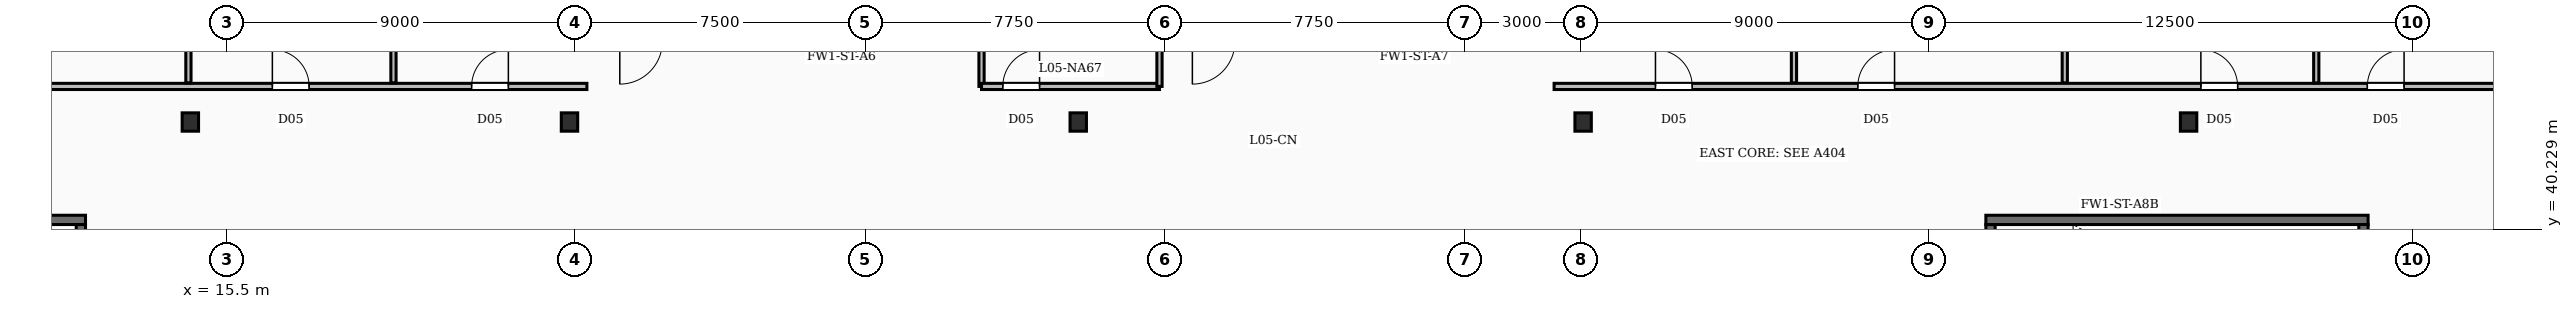
"""IFC4 building model, lengths in metres.
Left out: names, types, materials, properties, quantities, classifications, styles, units other than length and angle.
Written with IfcOpenShell. Run it as: python <this file> out.ifc"""

import sys

from ifc_helpers import new_model, si_unit, direction, frame, frame_2d, origin, origin_2d, place, context, subcontext, project, spatial, rectangle, i_section, extrude, element, fill, save


model = new_model("IFC4")
c1 = context("Model", 3, precision=1e-05, world=origin(), true_north=direction((0.0, 1.0)))
c2 = subcontext(c1, "Body", "Model", "MODEL_VIEW")
j1 = project(units=[si_unit("LENGTHUNIT", "METRE"), si_unit("PLANEANGLEUNIT", "RADIAN")], contexts=[c1])
p1 = place(None, origin())
s1 = spatial("IfcSite", under=j1, at=p1, CompositionType="ELEMENT")
p2 = place(p1, origin())
s2 = spatial("IfcBuilding", under=s1, at=p2, CompositionType="ELEMENT")
p3 = place(p2, frame((0.0, 0.0, 28.0)))
s3 = spatial("IfcBuildingStorey", under=s2, at=p3, CompositionType="ELEMENT", Elevation=28.0)
for number, where, z_axis, x_axis in (
    (1, (14.55, 43.0, -0.35), (0.0, 0.0, 1.0), (1.0, 0.0, 0.0)),
    (2, (24.35, 43.0, -0.35), (0.0, 0.0, 1.0), (1.0, 0.0, 0.0)),
    (3, (37.5, 43.0, -0.35), (0.0, 0.0, 1.0), (1.0, 0.0, 0.0)),
    (4, (50.55, 43.0, -0.35), (0.0, 0.0, 1.0), (1.0, 0.0, 0.0)),
    (5, (66.2, 43.0, -0.35), (0.0, 0.0, 1.0), (1.0, 0.0, 0.0)),
):
    element("IfcColumn", number, at=place(p3, frame(where, z_axis=z_axis, x_axis=x_axis)), inside=s3, PredefinedType="COLUMN", context=c2, shape_type="SweptSolid", body=[
        extrude(i_section(OverallWidth=0.424, OverallDepth=0.474, WebThickness=0.048, FlangeThickness=0.077, FilletRadius=0.02, at=origin_2d()), origin(), (0.0, 0.0, 1.0), 5.9),
    ])
p4 = place(p3, frame((1.96, 40.47, 0.0), z_axis=(0.0, 0.0, 1.0), x_axis=(1.0, 0.0, 0.0)))
e6 = element("IfcWall", 6, at=p4, inside=s3, PredefinedType="SOLIDWALL", context=c2, shape_type="SweptSolid", body=[
    extrude(rectangle(XDim=9.88, YDim=0.24, at=frame_2d((4.94, 0.0))), origin(), (0.0, 0.0, 1.0), 5.55),
])
p5 = place(p3, frame((11.72, 36.2, 0.0), z_axis=(0.0, 0.0, 1.0), x_axis=(0.0, 1.0, 0.0)))
e7 = element("IfcWall", 7, at=p5, inside=s3, PredefinedType="SOLIDWALL", context=c2, shape_type="SweptSolid", body=[
    extrude(rectangle(XDim=4.15, YDim=0.24, at=frame_2d((2.075, 0.0))), origin(), (0.0, 0.0, 1.0), 5.55),
])
p6 = place(p3, frame((60.96, 40.47, 0.0), z_axis=(0.0, 0.0, 1.0), x_axis=(1.0, 0.0, 0.0)))
e8 = element("IfcWall", 8, at=p6, inside=s3, PredefinedType="SOLIDWALL", context=c2, shape_type="SweptSolid", body=[
    extrude(rectangle(XDim=9.88, YDim=0.24, at=frame_2d((4.94, 0.0))), origin(), (0.0, 0.0, 1.0), 5.55),
])
for number, where, z_axis, x_axis in (
    (9, (61.08, 36.2, 0.0), (0.0, 0.0, 1.0), (0.0, 1.0, 0.0)),
    (10, (70.72, 36.2, 0.0), (0.0, 0.0, 1.0), (0.0, 1.0, 0.0)),
):
    element("IfcWall", number, at=place(p3, frame(where, z_axis=z_axis, x_axis=x_axis)), inside=s3, PredefinedType="SOLIDWALL", context=c2, shape_type="SweptSolid", body=[
        extrude(rectangle(XDim=4.15, YDim=0.24, at=frame_2d((2.075, 0.0))), origin(), (0.0, 0.0, 1.0), 5.55),
    ])
p7 = place(p3, frame((14.5, 44.01, 0.0), z_axis=(0.0, 0.0, 1.0), x_axis=(0.0, 1.0, 0.0)))
e11 = element("IfcWall", 11, at=p7, inside=s3, PredefinedType="PARTITIONING", context=c2, shape_type="SweptSolid", body=[
    extrude(rectangle(XDim=10.49, YDim=0.135, at=frame_2d((5.245, 0.0))), origin(), (0.0, 0.0, 1.0), 3.6),
])
p8 = place(p7, frame((2.2, 0.0, 0.0)))
e12 = element("IfcOpeningElement", 12, at=p8, cuts=e11, PredefinedType="OPENING", context=c2, shape_type="SweptSolid", body=[
    extrude(rectangle(XDim=0.95, YDim=2.15, at=frame_2d((0.475, 1.075))), frame((0.0, 0.077, 0.0), z_axis=(0.0, -1.0, 0.0), x_axis=(1.0, 0.0, 0.0)), (0.0, 0.0, 1.0), 0.155),
])
p9 = place(p3, frame((19.8, 44.01, 0.0), z_axis=(0.0, 0.0, 1.0), x_axis=(0.0, 1.0, 0.0)))
e13 = element("IfcWall", 13, at=p9, inside=s3, PredefinedType="PARTITIONING", context=c2, shape_type="SweptSolid", body=[
    extrude(rectangle(XDim=10.49, YDim=0.135, at=frame_2d((5.245, 0.0))), origin(), (0.0, 0.0, 1.0), 4.61),
])
p10 = place(p9, frame((2.2, 0.0, 0.0)))
e14 = element("IfcOpeningElement", 14, at=p10, cuts=e13, PredefinedType="OPENING", context=c2, shape_type="SweptSolid", body=[
    extrude(rectangle(XDim=0.95, YDim=2.15, at=frame_2d((0.475, 1.075))), frame((0.0, 0.077, 0.0), z_axis=(0.0, -1.0, 0.0), x_axis=(1.0, 0.0, 0.0)), (0.0, 0.0, 1.0), 0.155),
])
p11 = place(p3, frame((0.0, 43.92, 0.0), z_axis=(0.0, 0.0, 1.0), x_axis=(1.0, 0.0, 0.0)))
e15 = element("IfcWall", 15, at=p11, inside=s3, PredefinedType="PARTITIONING", context=c2, shape_type="SweptSolid", body=[
    extrude(rectangle(XDim=24.8, YDim=0.16, at=frame_2d((12.4, 0.0))), origin(), (0.0, 0.0, 1.0), 4.61),
])
p12 = place(p11, frame((16.67, 0.0, 0.0)))
e16 = element("IfcOpeningElement", 16, at=p12, cuts=e15, PredefinedType="OPENING", context=c2, shape_type="SweptSolid", body=[
    extrude(rectangle(XDim=0.95, YDim=2.15, at=frame_2d((0.475, 1.075))), frame((0.0, 0.09, 0.0), z_axis=(0.0, -1.0, 0.0), x_axis=(1.0, 0.0, 0.0)), (0.0, 0.0, 1.0), 0.18),
])
p13 = place(p11, frame((21.82, 0.0, 0.0)))
e17 = element("IfcOpeningElement", 17, at=p13, cuts=e15, PredefinedType="OPENING", context=c2, shape_type="SweptSolid", body=[
    extrude(rectangle(XDim=0.95, YDim=2.15, at=frame_2d((0.475, 1.075))), frame((0.0, 0.09, 0.0), z_axis=(0.0, -1.0, 0.0), x_axis=(1.0, 0.0, 0.0)), (0.0, 0.0, 1.0), 0.18),
])
p14 = place(p3, frame((56.0, 44.01, 0.0), z_axis=(0.0, 0.0, 1.0), x_axis=(0.0, 1.0, 0.0)))
e18 = element("IfcWall", 18, at=p14, inside=s3, PredefinedType="PARTITIONING", context=c2, shape_type="SweptSolid", body=[
    extrude(rectangle(XDim=10.49, YDim=0.135, at=frame_2d((5.245, 0.0))), origin(), (0.0, 0.0, 1.0), 4.61),
])
p15 = place(p14, frame((2.2, 0.0, 0.0)))
e19 = element("IfcOpeningElement", 19, at=p15, cuts=e18, PredefinedType="OPENING", context=c2, shape_type="SweptSolid", body=[
    extrude(rectangle(XDim=0.95, YDim=2.15, at=frame_2d((0.475, 1.075))), frame((0.0, 0.077, 0.0), z_axis=(0.0, -1.0, 0.0), x_axis=(1.0, 0.0, 0.0)), (0.0, 0.0, 1.0), 0.155),
])
p16 = place(p3, frame((63.0, 44.01, 0.0), z_axis=(0.0, 0.0, 1.0), x_axis=(0.0, 1.0, 0.0)))
e20 = element("IfcWall", 20, at=p16, inside=s3, PredefinedType="PARTITIONING", context=c2, shape_type="SweptSolid", body=[
    extrude(rectangle(XDim=10.49, YDim=0.135, at=frame_2d((5.245, 0.0))), origin(), (0.0, 0.0, 1.0), 4.61),
])
p17 = place(p16, frame((2.2, 0.0, 0.0)))
e21 = element("IfcOpeningElement", 21, at=p17, cuts=e20, PredefinedType="OPENING", context=c2, shape_type="SweptSolid", body=[
    extrude(rectangle(XDim=0.95, YDim=2.15, at=frame_2d((0.475, 1.075))), frame((0.0, 0.077, 0.0), z_axis=(0.0, -1.0, 0.0), x_axis=(1.0, 0.0, 0.0)), (0.0, 0.0, 1.0), 0.155),
])
p18 = place(p3, frame((69.5, 44.01, 0.0), z_axis=(0.0, 0.0, 1.0), x_axis=(0.0, 1.0, 0.0)))
e22 = element("IfcWall", 22, at=p18, inside=s3, PredefinedType="PARTITIONING", context=c2, shape_type="SweptSolid", body=[
    extrude(rectangle(XDim=10.49, YDim=0.135, at=frame_2d((5.245, 0.0))), origin(), (0.0, 0.0, 1.0), 4.61),
])
p19 = place(p18, frame((2.2, 0.0, 0.0)))
e23 = element("IfcOpeningElement", 23, at=p19, cuts=e22, PredefinedType="OPENING", context=c2, shape_type="SweptSolid", body=[
    extrude(rectangle(XDim=0.95, YDim=2.15, at=frame_2d((0.475, 1.075))), frame((0.0, 0.077, 0.0), z_axis=(0.0, -1.0, 0.0), x_axis=(1.0, 0.0, 0.0)), (0.0, 0.0, 1.0), 0.155),
])
p20 = place(p3, frame((49.8, 43.92, 0.0), z_axis=(0.0, 0.0, 1.0), x_axis=(1.0, 0.0, 0.0)))
e24 = element("IfcWall", 24, at=p20, inside=s3, PredefinedType="PARTITIONING", context=c2, shape_type="SweptSolid", body=[
    extrude(rectangle(XDim=29.7, YDim=0.16, at=frame_2d((14.85, 0.0))), origin(), (0.0, 0.0, 1.0), 4.61),
])
p21 = place(p20, frame((2.62, 0.0, 0.0)))
e25 = element("IfcOpeningElement", 25, at=p21, cuts=e24, PredefinedType="OPENING", context=c2, shape_type="SweptSolid", body=[
    extrude(rectangle(XDim=0.95, YDim=2.15, at=frame_2d((0.475, 1.075))), frame((0.0, 0.09, 0.0), z_axis=(0.0, -1.0, 0.0), x_axis=(1.0, 0.0, 0.0)), (0.0, 0.0, 1.0), 0.18),
])
p22 = place(p20, frame((7.85, 0.0, 0.0)))
e26 = element("IfcOpeningElement", 26, at=p22, cuts=e24, PredefinedType="OPENING", context=c2, shape_type="SweptSolid", body=[
    extrude(rectangle(XDim=0.95, YDim=2.15, at=frame_2d((0.475, 1.075))), frame((0.0, 0.09, 0.0), z_axis=(0.0, -1.0, 0.0), x_axis=(1.0, 0.0, 0.0)), (0.0, 0.0, 1.0), 0.18),
])
p23 = place(p20, frame((16.718, 0.0, 0.0)))
e27 = element("IfcOpeningElement", 27, at=p23, cuts=e24, PredefinedType="OPENING", context=c2, shape_type="SweptSolid", body=[
    extrude(rectangle(XDim=0.95, YDim=2.15, at=frame_2d((0.475, 1.075))), frame((0.0, 0.09, 0.0), z_axis=(0.0, -1.0, 0.0), x_axis=(1.0, 0.0, 0.0)), (0.0, 0.0, 1.0), 0.18),
])
p24 = place(p20, frame((21.02, 0.0, 0.0)))
e28 = element("IfcOpeningElement", 28, at=p24, cuts=e24, PredefinedType="OPENING", context=c2, shape_type="SweptSolid", body=[
    extrude(rectangle(XDim=0.95, YDim=2.15, at=frame_2d((0.475, 1.075))), frame((0.0, 0.09, 0.0), z_axis=(0.0, -1.0, 0.0), x_axis=(1.0, 0.0, 0.0)), (0.0, 0.0, 1.0), 0.18),
])
p25 = place(p3, frame((35.0, 43.92, 0.0), z_axis=(0.0, 0.0, 1.0), x_axis=(1.0, 0.0, 0.0)))
e29 = element("IfcWall", 29, at=p25, inside=s3, PredefinedType="PARTITIONING", context=c2, shape_type="SweptSolid", body=[
    extrude(rectangle(XDim=4.6, YDim=0.16, at=frame_2d((2.3, 0.0))), origin(), (0.0, 0.0, 1.0), 4.61),
])
p26 = place(p25, frame((0.55, 0.0, 0.0)))
e30 = element("IfcOpeningElement", 30, at=p26, cuts=e29, PredefinedType="OPENING", context=c2, shape_type="SweptSolid", body=[
    extrude(rectangle(XDim=0.95, YDim=2.15, at=frame_2d((0.475, 1.075))), frame((0.0, 0.09, 0.0), z_axis=(0.0, -1.0, 0.0), x_axis=(1.0, 0.0, 0.0)), (0.0, 0.0, 1.0), 0.18),
])
for number, where, z_axis, x_axis in (
    (31, (35.0, 43.92, 0.0), (0.0, 0.0, 1.0), (0.0, 1.0, 0.0)),
    (32, (39.6, 43.92, 0.0), (0.0, 0.0, 1.0), (0.0, 1.0, 0.0)),
):
    element("IfcWall", number, at=place(p3, frame(where, z_axis=z_axis, x_axis=x_axis)), inside=s3, PredefinedType="PARTITIONING", context=c2, shape_type="SweptSolid", body=[
        extrude(rectangle(XDim=10.58, YDim=0.135, at=frame_2d((5.29, 0.0))), origin(), (0.0, 0.0, 1.0), 4.61),
    ])
p27 = place(p12, origin())
e33 = element("IfcDoor", 33, at=p27, inside=s3, OperationType="SINGLE_SWING_LEFT", PredefinedType="DOOR", context=c2, shape_type="SweptSolid", body=[
    extrude(rectangle(XDim=0.95, YDim=2.15, at=frame_2d((0.475, 1.075))), frame((0.0, 0.025, 0.0), z_axis=(0.0, -1.0, 0.0), x_axis=(1.0, 0.0, 0.0)), (0.0, 0.0, 1.0), 0.05),
])
fill(e16, e33)
p28 = place(p13, origin())
e34 = element("IfcDoor", 34, at=p28, inside=s3, OperationType="SINGLE_SWING_RIGHT", PredefinedType="DOOR", context=c2, shape_type="SweptSolid", body=[
    extrude(rectangle(XDim=0.95, YDim=2.15, at=frame_2d((0.475, 1.075))), frame((0.0, 0.025, 0.0), z_axis=(0.0, -1.0, 0.0), x_axis=(1.0, 0.0, 0.0)), (0.0, 0.0, 1.0), 0.05),
])
fill(e17, e34)
p29 = place(p21, origin())
e35 = element("IfcDoor", 35, at=p29, inside=s3, OperationType="SINGLE_SWING_LEFT", PredefinedType="DOOR", context=c2, shape_type="SweptSolid", body=[
    extrude(rectangle(XDim=0.95, YDim=2.15, at=frame_2d((0.475, 1.075))), frame((0.0, 0.025, 0.0), z_axis=(0.0, -1.0, 0.0), x_axis=(1.0, 0.0, 0.0)), (0.0, 0.0, 1.0), 0.05),
])
fill(e25, e35)
p30 = place(p22, origin())
e36 = element("IfcDoor", 36, at=p30, inside=s3, OperationType="SINGLE_SWING_RIGHT", PredefinedType="DOOR", context=c2, shape_type="SweptSolid", body=[
    extrude(rectangle(XDim=0.95, YDim=2.15, at=frame_2d((0.475, 1.075))), frame((0.0, 0.025, 0.0), z_axis=(0.0, -1.0, 0.0), x_axis=(1.0, 0.0, 0.0)), (0.0, 0.0, 1.0), 0.05),
])
fill(e26, e36)
p31 = place(p23, origin())
e37 = element("IfcDoor", 37, at=p31, inside=s3, OperationType="SINGLE_SWING_LEFT", PredefinedType="DOOR", context=c2, shape_type="SweptSolid", body=[
    extrude(rectangle(XDim=0.95, YDim=2.15, at=frame_2d((0.475, 1.075))), frame((0.0, 0.025, 0.0), z_axis=(0.0, -1.0, 0.0), x_axis=(1.0, 0.0, 0.0)), (0.0, 0.0, 1.0), 0.05),
])
fill(e27, e37)
p32 = place(p24, origin())
e38 = element("IfcDoor", 38, at=p32, inside=s3, OperationType="SINGLE_SWING_RIGHT", PredefinedType="DOOR", context=c2, shape_type="SweptSolid", body=[
    extrude(rectangle(XDim=0.95, YDim=2.15, at=frame_2d((0.475, 1.075))), frame((0.0, 0.025, 0.0), z_axis=(0.0, -1.0, 0.0), x_axis=(1.0, 0.0, 0.0)), (0.0, 0.0, 1.0), 0.05),
])
fill(e28, e38)
p33 = place(p26, origin())
e39 = element("IfcDoor", 39, at=p33, inside=s3, OperationType="SINGLE_SWING_RIGHT", PredefinedType="DOOR", context=c2, shape_type="SweptSolid", body=[
    extrude(rectangle(XDim=0.95, YDim=2.15, at=frame_2d((0.475, 1.075))), frame((0.0, 0.025, 0.0), z_axis=(0.0, -1.0, 0.0), x_axis=(1.0, 0.0, 0.0)), (0.0, 0.0, 1.0), 0.05),
])
fill(e30, e39)
save(model, sys.argv[1])
